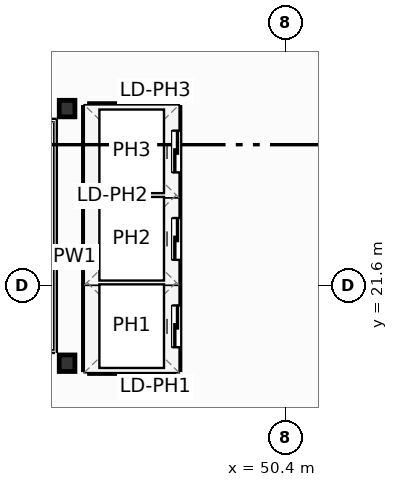
"""IFC4 building model, lengths in metres.
Left out: names, types, materials, properties, quantities, classifications, styles, units other than length and angle.
Written with IfcOpenShell. Run it as: python <this file> out.ifc"""

import sys

from ifc_helpers import new_model, si_unit, direction, frame, frame_2d, origin, origin_2d, place, context, subcontext, project, spatial, rectangle, i_section, extrude, element, fill, save


model = new_model("IFC4")
c1 = context("Model", 3, precision=1e-05, world=origin(), true_north=direction((0.0, 1.0)))
c2 = subcontext(c1, "Body", "Model", "MODEL_VIEW")
j1 = project(units=[si_unit("LENGTHUNIT", "METRE"), si_unit("PLANEANGLEUNIT", "RADIAN")], contexts=[c1])
p1 = place(None, origin())
s1 = spatial("IfcSite", under=j1, at=p1, CompositionType="ELEMENT")
p2 = place(p1, origin())
s2 = spatial("IfcBuilding", under=s1, at=p2, CompositionType="ELEMENT")
p3 = place(p2, frame((0.0, 0.0, 231.2)))
s3 = spatial("IfcBuildingStorey", under=s2, at=p3, CompositionType="ELEMENT", Elevation=231.2)
for number, where, z_axis, x_axis in (
    (1, (44.65, 19.55, 0.0), (0.0, 0.0, 1.0), (1.0, 0.0, 0.0)),
    (2, (44.65, 26.25, 0.0), (0.0, 0.0, 1.0), (1.0, 0.0, 0.0)),
):
    element("IfcColumn", number, at=place(p3, frame(where, z_axis=z_axis, x_axis=x_axis)), inside=s3, PredefinedType="COLUMN", context=c2, shape_type="SweptSolid", body=[
        extrude(i_section(OverallWidth=0.412, OverallDepth=0.435, WebThickness=0.036, FlangeThickness=0.057, FilletRadius=0.025, at=origin_2d()), origin(), (0.0, 0.0, 1.0), 3.7),
    ])
for number, where, z_axis, x_axis in (
    (3, (45.24, 21.675, 0.0), (0.0, 0.0, 1.0), (1.0, 0.0, 0.0)),
    (4, (45.24, 23.975, 0.0), (0.0, 0.0, 1.0), (1.0, 0.0, 0.0)),
):
    element("IfcWall", number, at=place(p3, frame(where, z_axis=z_axis, x_axis=x_axis)), inside=s3, PredefinedType="PARTITIONING", context=c2, shape_type="SweptSolid", body=[
        extrude(rectangle(XDim=2.22, YDim=0.2, at=frame_2d((1.11, 0.0))), origin(), (0.0, 0.0, 1.0), 3.45),
    ])
p4 = place(p3, frame((45.24, 19.38, 0.0), z_axis=(0.0, 0.0, 1.0), x_axis=(1.0, 0.0, 0.0)))
e5 = element("IfcWall", 5, at=p4, inside=s3, PredefinedType="PARTITIONING", context=c2, shape_type="SweptSolid", body=[
    extrude(rectangle(XDim=2.22, YDim=0.2, at=frame_2d((1.11, 0.0))), origin(), (0.0, 0.0, 1.0), 2.662),
])
p5 = place(p3, frame((45.24, 26.28, 0.0), z_axis=(0.0, 0.0, 1.0), x_axis=(1.0, 0.0, 0.0)))
e6 = element("IfcWall", 6, at=p5, inside=s3, PredefinedType="PARTITIONING", context=c2, shape_type="SweptSolid", body=[
    extrude(rectangle(XDim=2.22, YDim=0.2, at=frame_2d((1.11, 0.0))), origin(), (0.0, 0.0, 1.0), 3.45),
])
p6 = place(p3, frame((45.18, 19.38, 0.0), z_axis=(0.0, 0.0, 1.0), x_axis=(0.0, 1.0, 0.0)))
e7 = element("IfcWall", 7, at=p6, inside=s3, PredefinedType="PARTITIONING", context=c2, shape_type="SweptSolid", body=[
    extrude(rectangle(XDim=6.9, YDim=0.2, at=frame_2d((3.45, 0.0))), origin(), (0.0, 0.0, 1.0), 3.45),
])
p7 = place(p3, frame((47.52, 19.38, 0.0), z_axis=(0.0, 0.0, 1.0), x_axis=(0.0, 1.0, 0.0)))
e8 = element("IfcWall", 8, at=p7, inside=s3, PredefinedType="PARTITIONING", context=c2, shape_type="SweptSolid", body=[
    extrude(rectangle(XDim=6.9, YDim=0.2, at=frame_2d((3.45, 0.0))), origin(), (0.0, 0.0, 1.0), 3.45),
])
p8 = place(p7, frame((0.59, 0.0, 0.0)))
e9 = element("IfcOpeningElement", 9, at=p8, cuts=e8, PredefinedType="OPENING", context=c2, shape_type="SweptSolid", body=[
    extrude(rectangle(XDim=1.1, YDim=2.15, at=frame_2d((0.55, 1.075))), frame((0.0, 0.11, 0.0), z_axis=(0.0, -1.0, 0.0), x_axis=(1.0, 0.0, 0.0)), (0.0, 0.0, 1.0), 0.22),
])
p9 = place(p7, frame((2.89, 0.0, 0.0)))
e10 = element("IfcOpeningElement", 10, at=p9, cuts=e8, PredefinedType="OPENING", context=c2, shape_type="SweptSolid", body=[
    extrude(rectangle(XDim=1.1, YDim=2.15, at=frame_2d((0.55, 1.075))), frame((0.0, 0.11, 0.0), z_axis=(0.0, -1.0, 0.0), x_axis=(1.0, 0.0, 0.0)), (0.0, 0.0, 1.0), 0.22),
])
p10 = place(p7, frame((5.19, 0.0, 0.0)))
e11 = element("IfcOpeningElement", 11, at=p10, cuts=e8, PredefinedType="OPENING", context=c2, shape_type="SweptSolid", body=[
    extrude(rectangle(XDim=1.1, YDim=2.15, at=frame_2d((0.55, 1.075))), frame((0.0, 0.11, 0.0), z_axis=(0.0, -1.0, 0.0), x_axis=(1.0, 0.0, 0.0)), (0.0, 0.0, 1.0), 0.22),
])
p11 = place(p8, origin())
e12 = element("IfcDoor", 12, at=p11, inside=s3, OperationType="SLIDING_TO_LEFT", PredefinedType="DOOR", context=c2, shape_type="SweptSolid", body=[
    extrude(rectangle(XDim=1.1, YDim=2.15, at=frame_2d((0.55, 1.075))), frame((0.0, 0.025, 0.0), z_axis=(0.0, -1.0, 0.0), x_axis=(1.0, 0.0, 0.0)), (0.0, 0.0, 1.0), 0.05),
])
fill(e9, e12)
p12 = place(p9, origin())
e13 = element("IfcDoor", 13, at=p12, inside=s3, OperationType="SLIDING_TO_LEFT", PredefinedType="DOOR", context=c2, shape_type="SweptSolid", body=[
    extrude(rectangle(XDim=1.1, YDim=2.15, at=frame_2d((0.55, 1.075))), frame((0.0, 0.025, 0.0), z_axis=(0.0, -1.0, 0.0), x_axis=(1.0, 0.0, 0.0)), (0.0, 0.0, 1.0), 0.05),
])
fill(e10, e13)
p13 = place(p10, origin())
e14 = element("IfcDoor", 14, at=p13, inside=s3, OperationType="SLIDING_TO_LEFT", PredefinedType="DOOR", context=c2, shape_type="SweptSolid", body=[
    extrude(rectangle(XDim=1.1, YDim=2.15, at=frame_2d((0.55, 1.075))), frame((0.0, 0.025, 0.0), z_axis=(0.0, -1.0, 0.0), x_axis=(1.0, 0.0, 0.0)), (0.0, 0.0, 1.0), 0.05),
])
fill(e11, e14)
save(model, sys.argv[1])
